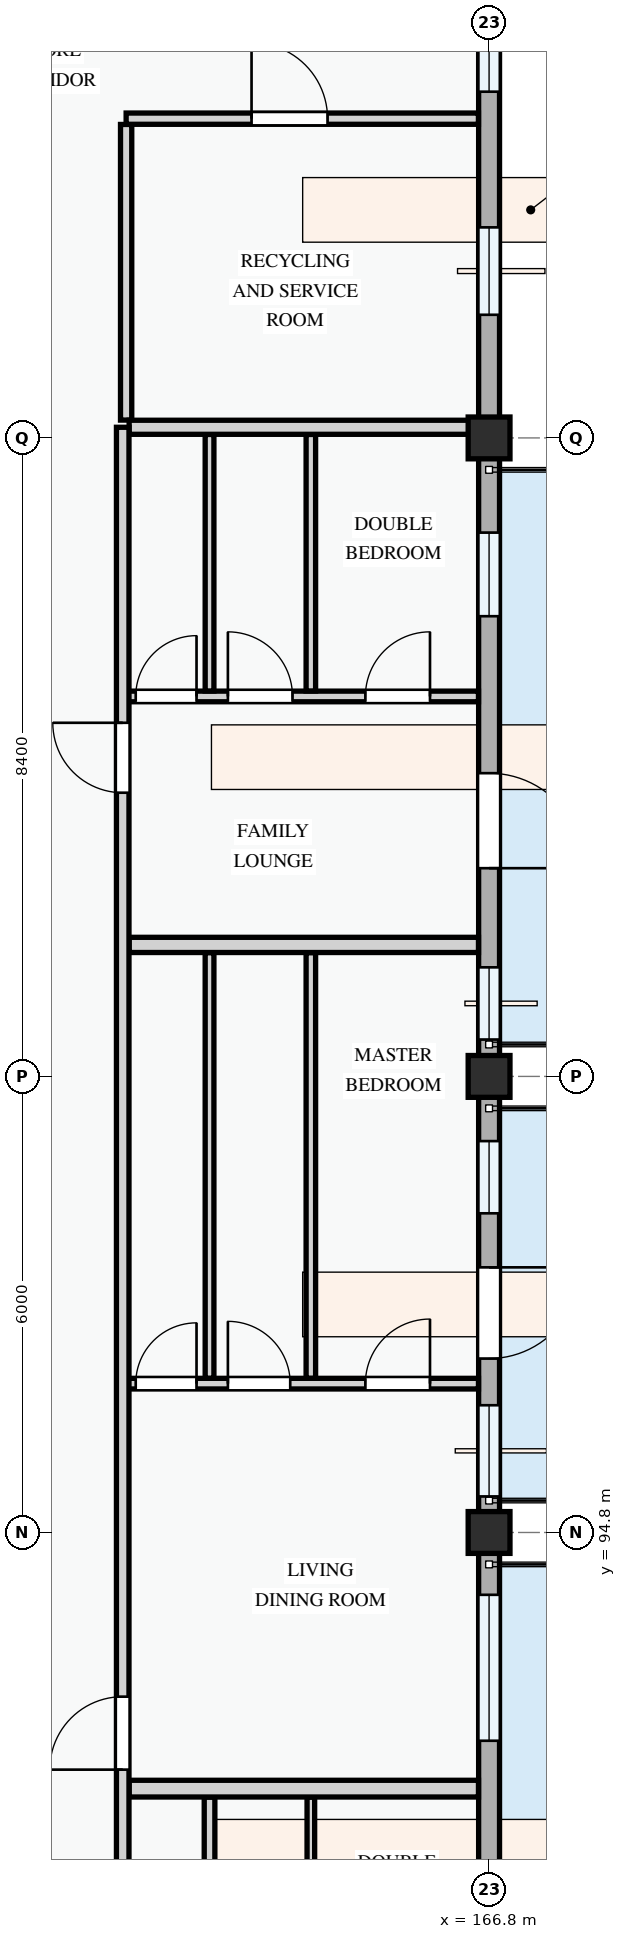
"""IFC4 building model, lengths in metres.
Left out: names, types, materials, properties, quantities, classifications, styles, units other than length and angle.
Written with IfcOpenShell. Run it as: python <this file> out.ifc"""

import sys

from ifc_helpers import new_model, si_unit, direction, frame, frame_2d, origin, origin_2d, place, context, subcontext, project, spatial, rectangle, extrude, element, fill, save


model = new_model("IFC4")
c1 = context("Model", 3, precision=1e-05, world=origin(), true_north=direction((0.0, 1.0)))
c2 = subcontext(c1, "Body", "Model", "MODEL_VIEW")
j1 = project(units=[si_unit("LENGTHUNIT", "METRE"), si_unit("PLANEANGLEUNIT", "RADIAN")], contexts=[c1])
p1 = place(None, origin())
s1 = spatial("IfcSite", under=j1, at=p1, CompositionType="ELEMENT")
p2 = place(p1, origin())
s2 = spatial("IfcBuilding", under=s1, at=p2, CompositionType="ELEMENT")
p3 = place(p2, frame((0.0, 0.0, 27.9)))
s3 = spatial("IfcBuildingStorey", under=s2, at=p3, CompositionType="ELEMENT", Elevation=27.9)
for number, where, z_axis, x_axis in (
    (1, (166.8, 94.8, 0.0), (0.0, 0.0, 1.0), (1.0, 0.0, 0.0)),
    (2, (166.8, 100.8, 0.0), (0.0, 0.0, 1.0), (1.0, 0.0, 0.0)),
    (3, (166.8, 109.2, 0.0), (0.0, 0.0, 1.0), (1.0, 0.0, 0.0)),
):
    element("IfcColumn", number, at=place(p3, frame(where, z_axis=z_axis, x_axis=x_axis)), inside=s3, PredefinedType="COLUMN", context=c2, shape_type="SweptSolid", body=[
        extrude(rectangle(XDim=0.55, YDim=0.55, at=origin_2d()), origin(), (0.0, 0.0, 1.0), 3.3),
    ])
p4 = place(p3, frame((166.8, 109.2, 0.0), z_axis=(0.0, 0.0, 1.0), x_axis=(0.0, 1.0, 0.0)))
e4 = element("IfcWall", 4, at=p4, inside=s3, PredefinedType="STANDARD", context=c2, shape_type="SweptSolid", body=[
    extrude(rectangle(XDim=6.0, YDim=0.275, at=frame_2d((3.0, 0.0))), origin(), (0.0, 0.0, 1.0), 2.445),
])
p5 = place(p4, frame((1.62, 0.0, 0.78)))
e5 = element("IfcOpeningElement", 5, at=p5, cuts=e4, PredefinedType="OPENING", context=c2, shape_type="SweptSolid", body=[
    extrude(rectangle(XDim=1.15, YDim=1.25, at=frame_2d((0.575, 0.625))), frame((0.0, 0.147, 0.0), z_axis=(0.0, -1.0, 0.0), x_axis=(1.0, 0.0, 0.0)), (0.0, 0.0, 1.0), 0.295),
])
p6 = place(p4, frame((4.555, 0.0, 0.78)))
e6 = element("IfcOpeningElement", 6, at=p6, cuts=e4, PredefinedType="OPENING", context=c2, shape_type="SweptSolid", body=[
    extrude(rectangle(XDim=0.9, YDim=1.2, at=frame_2d((0.45, 0.6))), frame((0.0, 0.147, 0.0), z_axis=(0.0, -1.0, 0.0), x_axis=(1.0, 0.0, 0.0)), (0.0, 0.0, 1.0), 0.295),
])
p7 = place(p3, frame((166.8, 86.4, 0.0), z_axis=(0.0, 0.0, 1.0), x_axis=(0.0, 1.0, 0.0)))
e7 = element("IfcWall", 7, at=p7, inside=s3, PredefinedType="STANDARD", context=c2, shape_type="SweptSolid", body=[
    extrude(rectangle(XDim=8.4, YDim=0.275, at=frame_2d((4.2, 0.0))), origin(), (0.0, 0.0, 1.0), 2.345),
])
p8 = place(p7, frame((0.62, 0.0, 0.0)))
e8 = element("IfcOpeningElement", 8, at=p8, cuts=e7, PredefinedType="OPENING", context=c2, shape_type="SweptSolid", body=[
    extrude(rectangle(XDim=1.1, YDim=2.15, at=frame_2d((0.55, 1.075))), frame((0.0, 0.147, 0.0), z_axis=(0.0, -1.0, 0.0), x_axis=(1.0, 0.0, 0.0)), (0.0, 0.0, 1.0), 0.295),
])
p9 = place(p7, frame((2.775, 0.0, 0.78)))
e9 = element("IfcOpeningElement", 9, at=p9, cuts=e7, PredefinedType="OPENING", context=c2, shape_type="SweptSolid", body=[
    extrude(rectangle(XDim=1.25, YDim=1.3, at=frame_2d((0.625, 0.65))), frame((0.0, 0.147, 0.0), z_axis=(0.0, -1.0, 0.0), x_axis=(1.0, 0.0, 0.0)), (0.0, 0.0, 1.0), 0.295),
])
p10 = place(p7, frame((5.66, 0.0, 0.78)))
e10 = element("IfcOpeningElement", 10, at=p10, cuts=e7, PredefinedType="OPENING", context=c2, shape_type="SweptSolid", body=[
    extrude(rectangle(XDim=1.92, YDim=1.44, at=frame_2d((0.96, 0.72))), frame((0.0, 0.147, 0.0), z_axis=(0.0, -1.0, 0.0), x_axis=(1.0, 0.0, 0.0)), (0.0, 0.0, 1.0), 0.295),
])
p11 = place(p3, frame((166.8, 94.8, 0.0), z_axis=(0.0, 0.0, 1.0), x_axis=(0.0, 1.0, 0.0)))
e11 = element("IfcWall", 11, at=p11, inside=s3, PredefinedType="STANDARD", context=c2, shape_type="SweptSolid", body=[
    extrude(rectangle(XDim=6.0, YDim=0.275, at=frame_2d((3.0, 0.0))), origin(), (0.0, 0.0, 1.0), 2.445),
])
p12 = place(p11, frame((2.288, 0.0, 0.0)))
e12 = element("IfcOpeningElement", 12, at=p12, cuts=e11, PredefinedType="OPENING", context=c2, shape_type="SweptSolid", body=[
    extrude(rectangle(XDim=1.2, YDim=2.15, at=frame_2d((0.6, 1.075))), frame((0.0, 0.147, 0.0), z_axis=(0.0, -1.0, 0.0), x_axis=(1.0, 0.0, 0.0)), (0.0, 0.0, 1.0), 0.295),
])
p13 = place(p11, frame((0.474, 0.0, 0.78)))
e13 = element("IfcOpeningElement", 13, at=p13, cuts=e11, PredefinedType="OPENING", context=c2, shape_type="SweptSolid", body=[
    extrude(rectangle(XDim=1.2, YDim=1.5, at=frame_2d((0.6, 0.75))), frame((0.0, 0.147, 0.0), z_axis=(0.0, -1.0, 0.0), x_axis=(1.0, 0.0, 0.0)), (0.0, 0.0, 1.0), 0.295),
])
p14 = place(p11, frame((4.199, 0.0, 0.78)))
e14 = element("IfcOpeningElement", 14, at=p14, cuts=e11, PredefinedType="OPENING", context=c2, shape_type="SweptSolid", body=[
    extrude(rectangle(XDim=0.95, YDim=1.15, at=frame_2d((0.475, 0.575))), frame((0.0, 0.147, 0.0), z_axis=(0.0, -1.0, 0.0), x_axis=(1.0, 0.0, 0.0)), (0.0, 0.0, 1.0), 0.295),
])
p15 = place(p3, frame((166.8, 100.8, 0.0), z_axis=(0.0, 0.0, 1.0), x_axis=(0.0, 1.0, 0.0)))
e15 = element("IfcWall", 15, at=p15, inside=s3, PredefinedType="STANDARD", context=c2, shape_type="SweptSolid", body=[
    extrude(rectangle(XDim=8.4, YDim=0.275, at=frame_2d((4.2, 0.0))), origin(), (0.0, 0.0, 1.0), 2.345),
])
p16 = place(p15, frame((2.74, 0.0, 0.0)))
e16 = element("IfcOpeningElement", 16, at=p16, cuts=e15, PredefinedType="OPENING", context=c2, shape_type="SweptSolid", body=[
    extrude(rectangle(XDim=1.25, YDim=2.2, at=frame_2d((0.625, 1.1))), frame((0.0, 0.147, 0.0), z_axis=(0.0, -1.0, 0.0), x_axis=(1.0, 0.0, 0.0)), (0.0, 0.0, 1.0), 0.295),
])
p17 = place(p15, frame((0.485, 0.0, 0.78)))
e17 = element("IfcOpeningElement", 17, at=p17, cuts=e15, PredefinedType="OPENING", context=c2, shape_type="SweptSolid", body=[
    extrude(rectangle(XDim=0.95, YDim=1.15, at=frame_2d((0.475, 0.575))), frame((0.0, 0.147, 0.0), z_axis=(0.0, -1.0, 0.0), x_axis=(1.0, 0.0, 0.0)), (0.0, 0.0, 1.0), 0.295),
])
p18 = place(p15, frame((6.054, 0.0, 0.78)))
e18 = element("IfcOpeningElement", 18, at=p18, cuts=e15, PredefinedType="OPENING", context=c2, shape_type="SweptSolid", body=[
    extrude(rectangle(XDim=1.1, YDim=1.3, at=frame_2d((0.55, 0.65))), frame((0.0, 0.147, 0.0), z_axis=(0.0, -1.0, 0.0), x_axis=(1.0, 0.0, 0.0)), (0.0, 0.0, 1.0), 0.295),
])
p19 = place(p3, frame((162.025, 113.324, 0.0), z_axis=(0.0, 0.0, 1.0), x_axis=(0.0, -1.0, 0.0)))
e19 = element("IfcWall", 19, at=p19, inside=s3, PredefinedType="PARTITIONING", context=c2, shape_type="SweptSolid", body=[
    extrude(rectangle(XDim=3.889, YDim=0.148, at=frame_2d((1.945, 0.0))), origin(), (0.0, 0.0, 1.0), 3.0),
])
p20 = place(p3, frame((162.025, 113.4, 0.0), z_axis=(0.0, 0.0, 1.0), x_axis=(1.0, 0.0, 0.0)))
e20 = element("IfcWall", 20, at=p20, inside=s3, PredefinedType="PARTITIONING", context=c2, shape_type="SweptSolid", body=[
    extrude(rectangle(XDim=4.635, YDim=0.148, at=frame_2d((2.317, 0.0))), origin(), (0.0, 0.0, 1.0), 3.0),
])
p21 = place(p20, frame((1.65, 0.0, 0.0)))
e21 = element("IfcOpeningElement", 21, at=p21, cuts=e20, PredefinedType="OPENING", context=c2, shape_type="SweptSolid", body=[
    extrude(rectangle(XDim=1.0, YDim=2.15, at=frame_2d((0.5, 1.075))), frame((0.0, 0.084, 0.0), z_axis=(0.0, -1.0, 0.0), x_axis=(1.0, 0.0, 0.0)), (0.0, 0.0, 1.0), 0.168),
])
p22 = place(p3, frame((164.455, 84.685, 0.0), z_axis=(0.0, 0.0, 1.0), x_axis=(0.0, 1.0, 0.0)))
e22 = element("IfcWall", 22, at=p22, inside=s3, PredefinedType="PARTITIONING", context=c2, shape_type="SweptSolid", body=[
    extrude(rectangle(XDim=6.633, YDim=0.1, at=frame_2d((3.316, 0.0))), origin(), (0.0, 0.0, 1.0), 3.0),
])
p23 = place(p3, frame((163.122, 84.685, 0.0), z_axis=(0.0, 0.0, 1.0), x_axis=(0.0, 1.0, 0.0)))
e23 = element("IfcWall", 23, at=p23, inside=s3, PredefinedType="PARTITIONING", context=c2, shape_type="SweptSolid", body=[
    extrude(rectangle(XDim=6.633, YDim=0.14, at=frame_2d((3.316, 0.0))), origin(), (0.0, 0.0, 1.0), 3.0),
])
p24 = place(p3, frame((161.98, 96.758, 0.0), z_axis=(0.0, 0.0, 1.0), x_axis=(1.0, 0.0, 0.0)))
e24 = element("IfcWall", 24, at=p24, inside=s3, PredefinedType="PARTITIONING", context=c2, shape_type="SweptSolid", body=[
    extrude(rectangle(XDim=4.68, YDim=0.14, at=frame_2d((2.34, 0.0))), origin(), (0.0, 0.0, 1.0), 3.0),
])
p25 = place(p24, frame((0.171, 0.0, 0.0)))
e25 = element("IfcOpeningElement", 25, at=p25, cuts=e24, PredefinedType="OPENING", context=c2, shape_type="SweptSolid", body=[
    extrude(rectangle(XDim=0.8, YDim=2.1, at=frame_2d((0.4, 1.05))), frame((0.0, 0.08, 0.0), z_axis=(0.0, -1.0, 0.0), x_axis=(1.0, 0.0, 0.0)), (0.0, 0.0, 1.0), 0.16),
])
p26 = place(p24, frame((1.384, 0.0, 0.0)))
e26 = element("IfcOpeningElement", 26, at=p26, cuts=e24, PredefinedType="OPENING", context=c2, shape_type="SweptSolid", body=[
    extrude(rectangle(XDim=0.82, YDim=2.08, at=frame_2d((0.41, 1.04))), frame((0.0, 0.08, 0.0), z_axis=(0.0, -1.0, 0.0), x_axis=(1.0, 0.0, 0.0)), (0.0, 0.0, 1.0), 0.16),
])
p27 = place(p24, frame((3.193, 0.0, 0.0)))
e27 = element("IfcOpeningElement", 27, at=p27, cuts=e24, PredefinedType="OPENING", context=c2, shape_type="SweptSolid", body=[
    extrude(rectangle(XDim=0.85, YDim=2.1, at=frame_2d((0.425, 1.05))), frame((0.0, 0.08, 0.0), z_axis=(0.0, -1.0, 0.0), x_axis=(1.0, 0.0, 0.0)), (0.0, 0.0, 1.0), 0.16),
])
p28 = place(p3, frame((164.455, 96.83, 0.0), z_axis=(0.0, 0.0, 1.0), x_axis=(0.0, 1.0, 0.0)))
e28 = element("IfcWall", 28, at=p28, inside=s3, PredefinedType="PARTITIONING", context=c2, shape_type="SweptSolid", body=[
    extrude(rectangle(XDim=5.598, YDim=0.125, at=frame_2d((2.799, 0.0))), origin(), (0.0, 0.0, 1.0), 3.0),
])
p29 = place(p3, frame((163.122, 96.83, 0.0), z_axis=(0.0, 0.0, 1.0), x_axis=(0.0, 1.0, 0.0)))
e29 = element("IfcWall", 29, at=p29, inside=s3, PredefinedType="PARTITIONING", context=c2, shape_type="SweptSolid", body=[
    extrude(rectangle(XDim=5.598, YDim=0.115, at=frame_2d((2.799, 0.0))), origin(), (0.0, 0.0, 1.0), 3.0),
])
p30 = place(p3, frame((162.064, 91.43, 0.0), z_axis=(0.0, 0.0, 1.0), x_axis=(1.0, 0.0, 0.0)))
e30 = element("IfcWall", 30, at=p30, inside=s3, PredefinedType="PARTITIONING", context=c2, shape_type="SweptSolid", body=[
    extrude(rectangle(XDim=4.596, YDim=0.22, at=frame_2d((2.298, 0.0))), origin(), (0.0, 0.0, 1.0), 3.0),
])
p31 = place(p3, frame((161.98, 105.799, 0.0), z_axis=(0.0, 0.0, 1.0), x_axis=(1.0, 0.0, 0.0)))
e31 = element("IfcWall", 31, at=p31, inside=s3, PredefinedType="PARTITIONING", context=c2, shape_type="SweptSolid", body=[
    extrude(rectangle(XDim=4.68, YDim=0.14, at=frame_2d((2.34, 0.0))), origin(), (0.0, 0.0, 1.0), 3.0),
])
p32 = place(p31, frame((0.171, 0.0, 0.0)))
e32 = element("IfcOpeningElement", 32, at=p32, cuts=e31, PredefinedType="OPENING", context=c2, shape_type="SweptSolid", body=[
    extrude(rectangle(XDim=0.8, YDim=2.1, at=frame_2d((0.4, 1.05))), frame((0.0, 0.08, 0.0), z_axis=(0.0, -1.0, 0.0), x_axis=(1.0, 0.0, 0.0)), (0.0, 0.0, 1.0), 0.16),
])
p33 = place(p31, frame((1.384, 0.0, 0.0)))
e33 = element("IfcOpeningElement", 33, at=p33, cuts=e31, PredefinedType="OPENING", context=c2, shape_type="SweptSolid", body=[
    extrude(rectangle(XDim=0.85, YDim=2.1, at=frame_2d((0.425, 1.05))), frame((0.0, 0.08, 0.0), z_axis=(0.0, -1.0, 0.0), x_axis=(1.0, 0.0, 0.0)), (0.0, 0.0, 1.0), 0.16),
])
p34 = place(p31, frame((3.193, 0.0, 0.0)))
e34 = element("IfcOpeningElement", 34, at=p34, cuts=e31, PredefinedType="OPENING", context=c2, shape_type="SweptSolid", body=[
    extrude(rectangle(XDim=0.85, YDim=2.1, at=frame_2d((0.425, 1.05))), frame((0.0, 0.08, 0.0), z_axis=(0.0, -1.0, 0.0), x_axis=(1.0, 0.0, 0.0)), (0.0, 0.0, 1.0), 0.16),
])
p35 = place(p3, frame((164.455, 105.871, 0.0), z_axis=(0.0, 0.0, 1.0), x_axis=(0.0, 1.0, 0.0)))
e35 = element("IfcWall", 35, at=p35, inside=s3, PredefinedType="PARTITIONING", context=c2, shape_type="SweptSolid", body=[
    extrude(rectangle(XDim=3.375, YDim=0.125, at=frame_2d((1.688, 0.0))), origin(), (0.0, 0.0, 1.0), 3.0),
])
p36 = place(p3, frame((163.122, 105.871, 0.0), z_axis=(0.0, 0.0, 1.0), x_axis=(0.0, 1.0, 0.0)))
e36 = element("IfcWall", 36, at=p36, inside=s3, PredefinedType="PARTITIONING", context=c2, shape_type="SweptSolid", body=[
    extrude(rectangle(XDim=3.375, YDim=0.115, at=frame_2d((1.688, 0.0))), origin(), (0.0, 0.0, 1.0), 3.0),
])
p37 = place(p3, frame((162.064, 102.53, 0.0), z_axis=(0.0, 0.0, 1.0), x_axis=(1.0, 0.0, 0.0)))
e37 = element("IfcWall", 37, at=p37, inside=s3, PredefinedType="PARTITIONING", context=c2, shape_type="SweptSolid", body=[
    extrude(rectangle(XDim=4.596, YDim=0.2, at=frame_2d((2.298, 0.0))), origin(), (0.0, 0.0, 1.0), 3.0),
])
p38 = place(p3, frame((162.064, 109.34, 0.0), z_axis=(0.0, 0.0, 1.0), x_axis=(1.0, 0.0, 0.0)))
e38 = element("IfcWall", 38, at=p38, inside=s3, PredefinedType="PARTITIONING", context=c2, shape_type="SweptSolid", body=[
    extrude(rectangle(XDim=4.596, YDim=0.185, at=frame_2d((2.298, 0.0))), origin(), (0.0, 0.0, 1.0), 2.375),
])
p39 = place(p3, frame((161.98, 80.54, 0.0), z_axis=(0.0, 0.0, 1.0), x_axis=(0.0, 1.0, 0.0)))
e39 = element("IfcWall", 39, at=p39, inside=s3, PredefinedType="PARTITIONING", context=c2, shape_type="SweptSolid", body=[
    extrude(rectangle(XDim=28.801, YDim=0.165, at=frame_2d((14.4, 0.0))), origin(), (0.0, 0.0, 1.0), 3.0),
])
p40 = place(p39, frame((2.369, 0.0, 0.0)))
e40 = element("IfcOpeningElement", 40, at=p40, cuts=e39, PredefinedType="OPENING", context=c2, shape_type="SweptSolid", body=[
    extrude(rectangle(XDim=0.92, YDim=2.1, at=frame_2d((0.46, 1.05))), frame((0.0, 0.093, 0.0), z_axis=(0.0, -1.0, 0.0), x_axis=(1.0, 0.0, 0.0)), (0.0, 0.0, 1.0), 0.185),
])
p41 = place(p39, frame((11.14, 0.0, 0.0)))
e41 = element("IfcOpeningElement", 41, at=p41, cuts=e39, PredefinedType="OPENING", context=c2, shape_type="SweptSolid", body=[
    extrude(rectangle(XDim=0.96, YDim=2.12, at=frame_2d((0.48, 1.06))), frame((0.0, 0.093, 0.0), z_axis=(0.0, -1.0, 0.0), x_axis=(1.0, 0.0, 0.0)), (0.0, 0.0, 1.0), 0.185),
])
p42 = place(p39, frame((23.993, 0.0, 0.0)))
e42 = element("IfcOpeningElement", 42, at=p42, cuts=e39, PredefinedType="OPENING", context=c2, shape_type="SweptSolid", body=[
    extrude(rectangle(XDim=0.92, YDim=2.1, at=frame_2d((0.46, 1.05))), frame((0.0, 0.093, 0.0), z_axis=(0.0, -1.0, 0.0), x_axis=(1.0, 0.0, 0.0)), (0.0, 0.0, 1.0), 0.185),
])
p43 = place(p5, origin())
e43 = element("IfcWindow", 43, at=p43, inside=s3, PartitioningType="SINGLE_PANEL", PredefinedType="WINDOW", context=c2, shape_type="SweptSolid", body=[
    extrude(rectangle(XDim=1.15, YDim=1.25, at=frame_2d((0.575, 0.625))), frame((0.0, 0.03, 0.0), z_axis=(0.0, -1.0, 0.0), x_axis=(1.0, 0.0, 0.0)), (0.0, 0.0, 1.0), 0.06),
])
fill(e5, e43)
p44 = place(p6, origin())
e44 = element("IfcWindow", 44, at=p44, inside=s3, PartitioningType="SINGLE_PANEL", PredefinedType="WINDOW", context=c2, shape_type="SweptSolid", body=[
    extrude(rectangle(XDim=0.9, YDim=1.2, at=frame_2d((0.45, 0.6))), frame((0.0, 0.03, 0.0), z_axis=(0.0, -1.0, 0.0), x_axis=(1.0, 0.0, 0.0)), (0.0, 0.0, 1.0), 0.06),
])
fill(e6, e44)
p45 = place(p10, origin())
e45 = element("IfcWindow", 45, at=p45, inside=s3, PartitioningType="DOUBLE_PANEL_VERTICAL", PredefinedType="WINDOW", context=c2, shape_type="SweptSolid", body=[
    extrude(rectangle(XDim=1.92, YDim=1.44, at=frame_2d((0.96, 0.72))), frame((0.0, 0.03, 0.0), z_axis=(0.0, -1.0, 0.0), x_axis=(1.0, 0.0, 0.0)), (0.0, 0.0, 1.0), 0.06),
])
fill(e10, e45)
p46 = place(p12, frame((1.2, 0.0, 0.0), z_axis=(0.0, 0.0, 1.0), x_axis=(-1.0, 0.0, 0.0)))
e46 = element("IfcDoor", 46, at=p46, inside=s3, OperationType="SINGLE_SWING_LEFT", PredefinedType="DOOR", context=c2, shape_type="SweptSolid", body=[
    extrude(rectangle(XDim=1.2, YDim=2.15, at=frame_2d((0.6, 1.075))), frame((0.0, 0.025, 0.0), z_axis=(0.0, -1.0, 0.0), x_axis=(1.0, 0.0, 0.0)), (0.0, 0.0, 1.0), 0.05),
])
fill(e12, e46)
p47 = place(p13, origin())
e47 = element("IfcWindow", 47, at=p47, inside=s3, PartitioningType="SINGLE_PANEL", PredefinedType="WINDOW", context=c2, shape_type="SweptSolid", body=[
    extrude(rectangle(XDim=1.2, YDim=1.5, at=frame_2d((0.6, 0.75))), frame((0.0, 0.03, 0.0), z_axis=(0.0, -1.0, 0.0), x_axis=(1.0, 0.0, 0.0)), (0.0, 0.0, 1.0), 0.06),
])
fill(e13, e47)
p48 = place(p14, origin())
e48 = element("IfcWindow", 48, at=p48, inside=s3, PartitioningType="SINGLE_PANEL", PredefinedType="WINDOW", context=c2, shape_type="SweptSolid", body=[
    extrude(rectangle(XDim=0.95, YDim=1.15, at=frame_2d((0.475, 0.575))), frame((0.0, 0.03, 0.0), z_axis=(0.0, -1.0, 0.0), x_axis=(1.0, 0.0, 0.0)), (0.0, 0.0, 1.0), 0.06),
])
fill(e14, e48)
p49 = place(p16, frame((1.25, 0.0, 0.0), z_axis=(0.0, 0.0, 1.0), x_axis=(-1.0, 0.0, 0.0)))
e49 = element("IfcDoor", 49, at=p49, inside=s3, OperationType="SINGLE_SWING_RIGHT", PredefinedType="DOOR", context=c2, shape_type="SweptSolid", body=[
    extrude(rectangle(XDim=1.25, YDim=2.2, at=frame_2d((0.625, 1.1))), frame((0.0, 0.025, 0.0), z_axis=(0.0, -1.0, 0.0), x_axis=(1.0, 0.0, 0.0)), (0.0, 0.0, 1.0), 0.05),
])
fill(e16, e49)
p50 = place(p17, origin())
e50 = element("IfcWindow", 50, at=p50, inside=s3, PartitioningType="SINGLE_PANEL", PredefinedType="WINDOW", context=c2, shape_type="SweptSolid", body=[
    extrude(rectangle(XDim=0.95, YDim=1.15, at=frame_2d((0.475, 0.575))), frame((0.0, 0.03, 0.0), z_axis=(0.0, -1.0, 0.0), x_axis=(1.0, 0.0, 0.0)), (0.0, 0.0, 1.0), 0.06),
])
fill(e17, e50)
p51 = place(p18, origin())
e51 = element("IfcWindow", 51, at=p51, inside=s3, PartitioningType="SINGLE_PANEL", PredefinedType="WINDOW", context=c2, shape_type="SweptSolid", body=[
    extrude(rectangle(XDim=1.1, YDim=1.3, at=frame_2d((0.55, 0.65))), frame((0.0, 0.03, 0.0), z_axis=(0.0, -1.0, 0.0), x_axis=(1.0, 0.0, 0.0)), (0.0, 0.0, 1.0), 0.06),
])
fill(e18, e51)
p52 = place(p21, origin())
e52 = element("IfcDoor", 52, at=p52, inside=s3, OperationType="SINGLE_SWING_LEFT", PredefinedType="DOOR", context=c2, shape_type="SweptSolid", body=[
    extrude(rectangle(XDim=1.0, YDim=2.15, at=frame_2d((0.5, 1.075))), frame((0.0, 0.025, 0.0), z_axis=(0.0, -1.0, 0.0), x_axis=(1.0, 0.0, 0.0)), (0.0, 0.0, 1.0), 0.05),
])
fill(e21, e52)
p53 = place(p25, origin())
e53 = element("IfcDoor", 53, at=p53, inside=s3, OperationType="SINGLE_SWING_RIGHT", PredefinedType="DOOR", context=c2, shape_type="SweptSolid", body=[
    extrude(rectangle(XDim=0.8, YDim=2.1, at=frame_2d((0.4, 1.05))), frame((0.0, 0.025, 0.0), z_axis=(0.0, -1.0, 0.0), x_axis=(1.0, 0.0, 0.0)), (0.0, 0.0, 1.0), 0.05),
])
fill(e25, e53)
p54 = place(p26, origin())
e54 = element("IfcDoor", 54, at=p54, inside=s3, OperationType="SINGLE_SWING_LEFT", PredefinedType="DOOR", context=c2, shape_type="SweptSolid", body=[
    extrude(rectangle(XDim=0.82, YDim=2.08, at=frame_2d((0.41, 1.04))), frame((0.0, 0.025, 0.0), z_axis=(0.0, -1.0, 0.0), x_axis=(1.0, 0.0, 0.0)), (0.0, 0.0, 1.0), 0.05),
])
fill(e26, e54)
p55 = place(p27, origin())
e55 = element("IfcDoor", 55, at=p55, inside=s3, OperationType="SINGLE_SWING_RIGHT", PredefinedType="DOOR", context=c2, shape_type="SweptSolid", body=[
    extrude(rectangle(XDim=0.85, YDim=2.1, at=frame_2d((0.425, 1.05))), frame((0.0, 0.025, 0.0), z_axis=(0.0, -1.0, 0.0), x_axis=(1.0, 0.0, 0.0)), (0.0, 0.0, 1.0), 0.05),
])
fill(e27, e55)
p56 = place(p32, origin())
e56 = element("IfcDoor", 56, at=p56, inside=s3, OperationType="SINGLE_SWING_RIGHT", PredefinedType="DOOR", context=c2, shape_type="SweptSolid", body=[
    extrude(rectangle(XDim=0.8, YDim=2.1, at=frame_2d((0.4, 1.05))), frame((0.0, 0.025, 0.0), z_axis=(0.0, -1.0, 0.0), x_axis=(1.0, 0.0, 0.0)), (0.0, 0.0, 1.0), 0.05),
])
fill(e32, e56)
p57 = place(p33, origin())
e57 = element("IfcDoor", 57, at=p57, inside=s3, OperationType="SINGLE_SWING_LEFT", PredefinedType="DOOR", context=c2, shape_type="SweptSolid", body=[
    extrude(rectangle(XDim=0.85, YDim=2.1, at=frame_2d((0.425, 1.05))), frame((0.0, 0.025, 0.0), z_axis=(0.0, -1.0, 0.0), x_axis=(1.0, 0.0, 0.0)), (0.0, 0.0, 1.0), 0.05),
])
fill(e33, e57)
p58 = place(p34, origin())
e58 = element("IfcDoor", 58, at=p58, inside=s3, OperationType="SINGLE_SWING_RIGHT", PredefinedType="DOOR", context=c2, shape_type="SweptSolid", body=[
    extrude(rectangle(XDim=0.85, YDim=2.1, at=frame_2d((0.425, 1.05))), frame((0.0, 0.025, 0.0), z_axis=(0.0, -1.0, 0.0), x_axis=(1.0, 0.0, 0.0)), (0.0, 0.0, 1.0), 0.05),
])
fill(e34, e58)
p59 = place(p41, origin())
e59 = element("IfcDoor", 59, at=p59, inside=s3, OperationType="SINGLE_SWING_LEFT", PredefinedType="DOOR", context=c2, shape_type="SweptSolid", body=[
    extrude(rectangle(XDim=0.96, YDim=2.12, at=frame_2d((0.48, 1.06))), frame((0.0, 0.025, 0.0), z_axis=(0.0, -1.0, 0.0), x_axis=(1.0, 0.0, 0.0)), (0.0, 0.0, 1.0), 0.05),
])
fill(e41, e59)
p60 = place(p42, origin())
e60 = element("IfcDoor", 60, at=p60, inside=s3, OperationType="SINGLE_SWING_RIGHT", PredefinedType="DOOR", context=c2, shape_type="SweptSolid", body=[
    extrude(rectangle(XDim=0.92, YDim=2.1, at=frame_2d((0.46, 1.05))), frame((0.0, 0.025, 0.0), z_axis=(0.0, -1.0, 0.0), x_axis=(1.0, 0.0, 0.0)), (0.0, 0.0, 1.0), 0.05),
])
fill(e42, e60)
save(model, sys.argv[1])
